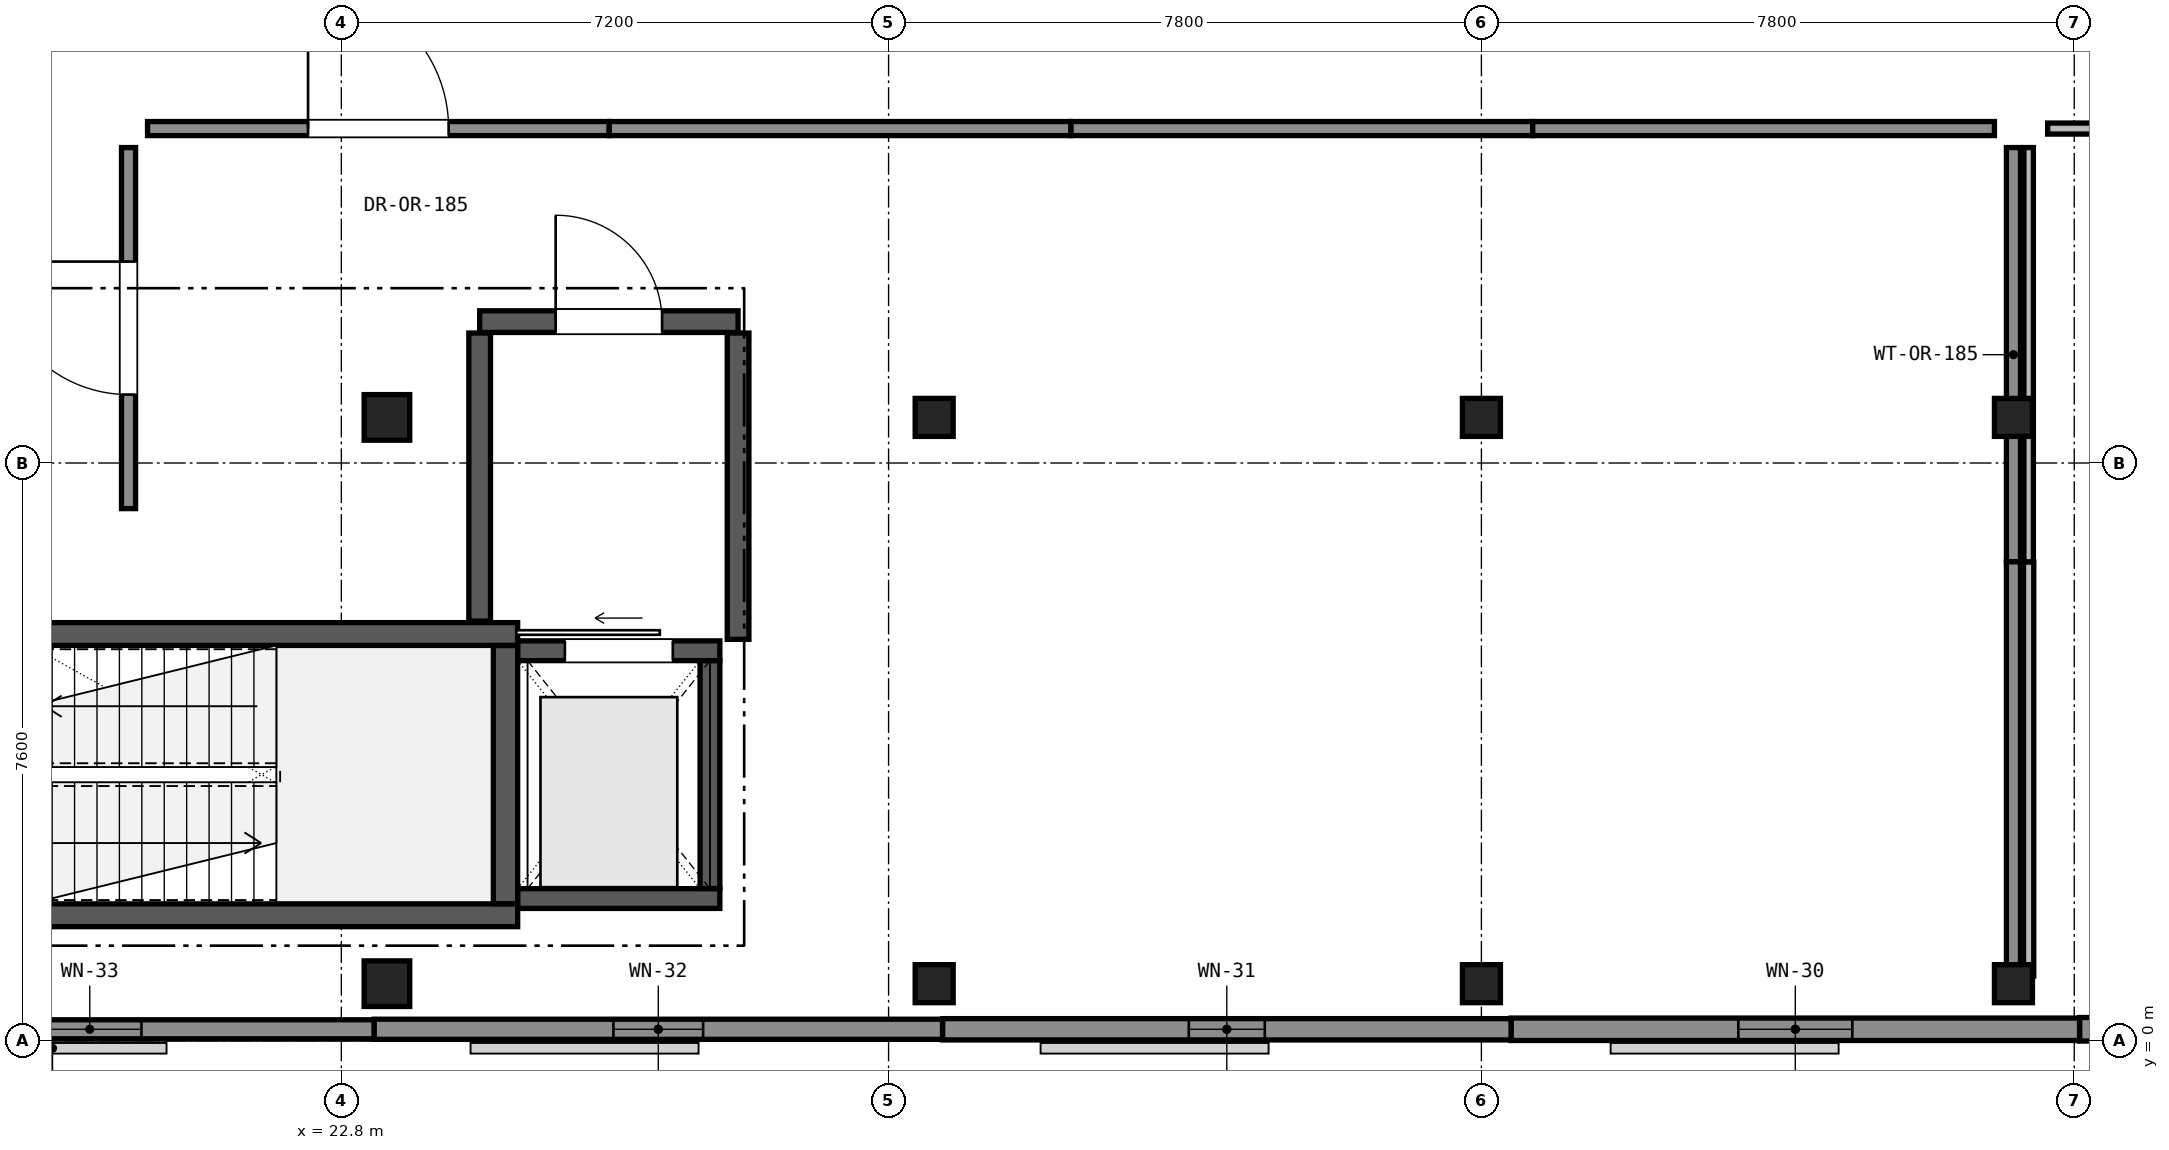
"""IFC4 building model, lengths in metres.
Left out: names, types, materials, properties, quantities, classifications, styles, units other than length and angle.
Written with IfcOpenShell. Run it as: python <this file> out.ifc"""

import sys

from ifc_helpers import new_model, si_unit, direction, frame, frame_2d, origin, origin_2d, place, context, subcontext, project, spatial, rectangle, extrude, element, fill, save


model = new_model("IFC4")
c1 = context("Model", 3, precision=1e-05, world=origin(), true_north=direction((0.0, 1.0)))
c2 = subcontext(c1, "Body", "Model", "MODEL_VIEW")
j1 = project(units=[si_unit("LENGTHUNIT", "METRE"), si_unit("PLANEANGLEUNIT", "RADIAN")], contexts=[c1])
p1 = place(None, origin())
s1 = spatial("IfcSite", under=j1, at=p1, CompositionType="ELEMENT")
p2 = place(p1, origin())
s2 = spatial("IfcBuilding", under=s1, at=p2, CompositionType="ELEMENT")
p3 = place(p2, frame((0.0, 0.0, 13.6)))
s3 = spatial("IfcBuildingStorey", under=s2, at=p3, CompositionType="ELEMENT", Elevation=13.6)
for number, where, z_axis, x_axis in (
    (1, (23.4, 0.75, 0.0), (0.0, 0.0, 1.0), (1.0, 0.0, 0.0)),
    (2, (23.4, 8.2, 0.0), (0.0, 0.0, 1.0), (1.0, 0.0, 0.0)),
):
    element("IfcColumn", number, at=place(p3, frame(where, z_axis=z_axis, x_axis=x_axis)), inside=s3, PredefinedType="COLUMN", context=c2, shape_type="SweptSolid", body=[
        extrude(rectangle(XDim=0.6, YDim=0.6, at=origin_2d()), origin(), (0.0, 0.0, 1.0), 4.08),
    ])
for number, where, z_axis, x_axis in (
    (3, (30.6, 0.75, 0.0), (0.0, 0.0, 1.0), (1.0, 0.0, 0.0)),
    (4, (30.6, 8.2, 0.0), (0.0, 0.0, 1.0), (1.0, 0.0, 0.0)),
    (5, (37.8, 0.75, 0.0), (0.0, 0.0, 1.0), (1.0, 0.0, 0.0)),
    (6, (37.8, 8.2, 0.0), (0.0, 0.0, 1.0), (1.0, 0.0, 0.0)),
    (7, (44.8, 0.75, 0.0), (0.0, 0.0, 1.0), (1.0, 0.0, 0.0)),
    (8, (44.8, 8.2, 0.0), (0.0, 0.0, 1.0), (1.0, 0.0, 0.0)),
):
    element("IfcColumn", number, at=place(p3, frame(where, z_axis=z_axis, x_axis=x_axis)), inside=s3, PredefinedType="COLUMN", context=c2, shape_type="SweptSolid", body=[
        extrude(rectangle(XDim=0.5, YDim=0.5, at=origin_2d()), origin(), (0.0, 0.0, 1.0), 4.08),
    ])
p4 = place(p3, frame((53.15, 0.15, 0.0), z_axis=(0.0, 0.0, 1.0), x_axis=(-1.0, 0.0, 0.0)))
e9 = element("IfcWall", 9, at=p4, inside=s3, PredefinedType="SOLIDWALL", context=c2, shape_type="SweptSolid", body=[
    extrude(rectangle(XDim=7.48, YDim=0.31, at=frame_2d((3.74, 0.0))), origin(), (0.0, 0.0, 1.0), 3.72),
])
p5 = place(p4, frame((2.49, 0.0, 0.9)))
e10 = element("IfcOpeningElement", 10, at=p5, cuts=e9, PredefinedType="OPENING", context=c2, shape_type="SweptSolid", body=[
    extrude(rectangle(XDim=2.5, YDim=2.0, at=frame_2d((1.25, 1.0))), frame((0.0, 0.165, 0.0), z_axis=(0.0, -1.0, 0.0), x_axis=(1.0, 0.0, 0.0)), (0.0, 0.0, 1.0), 0.33),
])
p6 = place(p3, frame((45.67, 0.15, 0.0), z_axis=(0.0, 0.0, 1.0), x_axis=(-1.0, 0.0, 0.0)))
e11 = element("IfcWall", 11, at=p6, inside=s3, PredefinedType="SOLIDWALL", context=c2, shape_type="SweptSolid", body=[
    extrude(rectangle(XDim=7.48, YDim=0.295, at=frame_2d((3.74, 0.0))), origin(), (0.0, 0.0, 1.0), 3.72),
])
p7 = place(p6, frame((2.99, 0.0, 0.9)))
e12 = element("IfcOpeningElement", 12, at=p7, cuts=e11, PredefinedType="OPENING", context=c2, shape_type="SweptSolid", body=[
    extrude(rectangle(XDim=1.5, YDim=2.2, at=frame_2d((0.75, 1.1))), frame((0.0, 0.157, 0.0), z_axis=(0.0, -1.0, 0.0), x_axis=(1.0, 0.0, 0.0)), (0.0, 0.0, 1.0), 0.315),
])
p8 = place(p3, frame((38.19, 0.15, 0.0), z_axis=(0.0, 0.0, 1.0), x_axis=(-1.0, 0.0, 0.0)))
e13 = element("IfcWall", 13, at=p8, inside=s3, PredefinedType="SOLIDWALL", context=c2, shape_type="SweptSolid", body=[
    extrude(rectangle(XDim=7.48, YDim=0.28, at=frame_2d((3.74, 0.0))), origin(), (0.0, 0.0, 1.0), 3.72),
])
p9 = place(p8, frame((3.24, 0.0, 0.9)))
e14 = element("IfcOpeningElement", 14, at=p9, cuts=e13, PredefinedType="OPENING", context=c2, shape_type="SweptSolid", body=[
    extrude(rectangle(XDim=1.0, YDim=1.62, at=frame_2d((0.5, 0.81))), frame((0.0, 0.15, 0.0), z_axis=(0.0, -1.0, 0.0), x_axis=(1.0, 0.0, 0.0)), (0.0, 0.0, 1.0), 0.3),
])
p10 = place(p3, frame((30.71, 0.15, 0.0), z_axis=(0.0, 0.0, 1.0), x_axis=(-1.0, 0.0, 0.0)))
e15 = element("IfcWall", 15, at=p10, inside=s3, PredefinedType="SOLIDWALL", context=c2, shape_type="SweptSolid", body=[
    extrude(rectangle(XDim=7.48, YDim=0.265, at=frame_2d((3.74, 0.0))), origin(), (0.0, 0.0, 1.0), 3.72),
])
p11 = place(p10, frame((3.15, 0.0, 0.9)))
e16 = element("IfcOpeningElement", 16, at=p11, cuts=e15, PredefinedType="OPENING", context=c2, shape_type="SweptSolid", body=[
    extrude(rectangle(XDim=1.18, YDim=1.62, at=frame_2d((0.59, 0.81))), frame((0.0, 0.142, 0.0), z_axis=(0.0, -1.0, 0.0), x_axis=(1.0, 0.0, 0.0)), (0.0, 0.0, 1.0), 0.285),
])
p12 = place(p3, frame((23.23, 0.15, 0.0), z_axis=(0.0, 0.0, 1.0), x_axis=(-1.0, 0.0, 0.0)))
e17 = element("IfcWall", 17, at=p12, inside=s3, PredefinedType="SOLIDWALL", context=c2, shape_type="SweptSolid", body=[
    extrude(rectangle(XDim=7.48, YDim=0.25, at=frame_2d((3.74, 0.0))), origin(), (0.0, 0.0, 1.0), 3.72),
])
p13 = place(p12, frame((3.06, 0.0, 0.9)))
e18 = element("IfcOpeningElement", 18, at=p13, cuts=e17, PredefinedType="OPENING", context=c2, shape_type="SweptSolid", body=[
    extrude(rectangle(XDim=1.36, YDim=1.62, at=frame_2d((0.68, 0.81))), frame((0.0, 0.135, 0.0), z_axis=(0.0, -1.0, 0.0), x_axis=(1.0, 0.0, 0.0)), (0.0, 0.0, 1.0), 0.27),
])
p14 = place(p3, frame((16.7, 1.65, 0.0), z_axis=(0.0, 0.0, 1.0), x_axis=(1.0, 0.0, 0.0)))
e19 = element("IfcWall", 19, at=p14, inside=s3, PredefinedType="SHEAR", context=c2, shape_type="SweptSolid", body=[
    extrude(rectangle(XDim=8.42, YDim=0.3, at=frame_2d((4.21, 0.0))), origin(), (0.0, 0.0, 1.0), 3.72),
])
p15 = place(p3, frame((16.7, 5.35, 0.0), z_axis=(0.0, 0.0, 1.0), x_axis=(1.0, 0.0, 0.0)))
e20 = element("IfcWall", 20, at=p15, inside=s3, PredefinedType="SHEAR", context=c2, shape_type="SweptSolid", body=[
    extrude(rectangle(XDim=8.42, YDim=0.3, at=frame_2d((4.21, 0.0))), origin(), (0.0, 0.0, 1.0), 3.72),
])
p16 = place(p15, frame((0.55, 0.0, 0.0)))
e21 = element("IfcOpeningElement", 21, at=p16, cuts=e20, PredefinedType="OPENING", context=c2, shape_type="SweptSolid", body=[
    extrude(rectangle(XDim=1.2, YDim=2.2, at=frame_2d((0.6, 1.1))), frame((0.0, 0.16, 0.0), z_axis=(0.0, -1.0, 0.0), x_axis=(1.0, 0.0, 0.0)), (0.0, 0.0, 1.0), 0.32),
])
p17 = place(p3, frame((24.96, 1.802, 0.0), z_axis=(0.0, 0.0, 1.0), x_axis=(0.0, 1.0, 0.0)))
e22 = element("IfcWall", 22, at=p17, inside=s3, PredefinedType="SHEAR", context=c2, shape_type="SweptSolid", body=[
    extrude(rectangle(XDim=3.396, YDim=0.32, at=frame_2d((1.698, 0.0))), origin(), (0.0, 0.0, 1.0), 3.72),
])
p18 = place(p3, frame((25.122, 1.87, 0.0), z_axis=(0.0, 0.0, 1.0), x_axis=(1.0, 0.0, 0.0)))
e23 = element("IfcWall", 23, at=p18, inside=s3, PredefinedType="SHEAR", context=c2, shape_type="SweptSolid", body=[
    extrude(rectangle(XDim=2.658, YDim=0.26, at=frame_2d((1.329, 0.0))), origin(), (0.0, 0.0, 1.0), 3.72),
])
p19 = place(p3, frame((25.122, 5.13, 0.0), z_axis=(0.0, 0.0, 1.0), x_axis=(1.0, 0.0, 0.0)))
e24 = element("IfcWall", 24, at=p19, inside=s3, PredefinedType="SHEAR", context=c2, shape_type="SweptSolid", body=[
    extrude(rectangle(XDim=2.658, YDim=0.26, at=frame_2d((1.329, 0.0))), origin(), (0.0, 0.0, 1.0), 3.72),
])
p20 = place(p19, frame((0.619, 0.0, 0.0)))
e25 = element("IfcOpeningElement", 25, at=p20, cuts=e24, PredefinedType="OPENING", context=c2, shape_type="SweptSolid", body=[
    extrude(rectangle(XDim=1.42, YDim=2.25, at=frame_2d((0.71, 1.125))), frame((0.0, 0.14, 0.0), z_axis=(0.0, -1.0, 0.0), x_axis=(1.0, 0.0, 0.0)), (0.0, 0.0, 1.0), 0.28),
])
p21 = place(p3, frame((27.65, 2.002, 0.0), z_axis=(0.0, 0.0, 1.0), x_axis=(0.0, 1.0, 0.0)))
e26 = element("IfcWall", 26, at=p21, inside=s3, PredefinedType="SHEAR", context=c2, shape_type="SweptSolid", body=[
    extrude(rectangle(XDim=2.996, YDim=0.26, at=frame_2d((1.498, 0.0))), origin(), (0.0, 0.0, 1.0), 3.72),
])
p22 = place(p3, frame((24.62, 9.46, 0.0), z_axis=(0.0, 0.0, 1.0), x_axis=(1.0, 0.0, 0.0)))
e27 = element("IfcWall", 27, at=p22, inside=s3, PredefinedType="SHEAR", context=c2, shape_type="SweptSolid", body=[
    extrude(rectangle(XDim=3.4, YDim=0.285, at=frame_2d((1.7, 0.0))), origin(), (0.0, 0.0, 1.0), 3.72),
])
p23 = place(p22, frame((1.0, 0.0, 0.0)))
e28 = element("IfcOpeningElement", 28, at=p23, cuts=e27, PredefinedType="OPENING", context=c2, shape_type="SweptSolid", body=[
    extrude(rectangle(XDim=1.4, YDim=2.25, at=frame_2d((0.7, 1.125))), frame((0.0, 0.152, 0.0), z_axis=(0.0, -1.0, 0.0), x_axis=(1.0, 0.0, 0.0)), (0.0, 0.0, 1.0), 0.305),
])
p24 = place(p3, frame((24.62, 5.52, 0.0), z_axis=(0.0, 0.0, 1.0), x_axis=(0.0, 1.0, 0.0)))
e29 = element("IfcWall", 29, at=p24, inside=s3, PredefinedType="SHEAR", context=c2, shape_type="SweptSolid", body=[
    extrude(rectangle(XDim=3.79, YDim=0.285, at=frame_2d((1.895, 0.0))), origin(), (0.0, 0.0, 1.0), 2.77),
])
p25 = place(p3, frame((28.02, 5.28, 0.0), z_axis=(0.0, 0.0, 1.0), x_axis=(0.0, 1.0, 0.0)))
e30 = element("IfcWall", 30, at=p25, inside=s3, PredefinedType="SHEAR", context=c2, shape_type="SweptSolid", body=[
    extrude(rectangle(XDim=4.03, YDim=0.285, at=frame_2d((2.015, 0.0))), origin(), (0.0, 0.0, 1.0), 2.77),
])
p26 = place(p3, frame((44.8, 11.75, 0.0), z_axis=(0.0, 0.0, 1.0), x_axis=(0.0, -1.0, 0.0)))
e31 = element("IfcWall", 31, at=p26, inside=s3, PredefinedType="PARTITIONING", context=c2, shape_type="SweptSolid", body=[
    extrude(rectangle(XDim=5.45, YDim=0.185, at=frame_2d((2.725, 0.0))), origin(), (0.0, 0.0, 1.0), 2.92),
])
p27 = place(p3, frame((44.8, 6.3, 0.0), z_axis=(0.0, 0.0, 1.0), x_axis=(0.0, -1.0, 0.0)))
e32 = element("IfcWall", 32, at=p27, inside=s3, PredefinedType="PARTITIONING", context=c2, shape_type="SweptSolid", body=[
    extrude(rectangle(XDim=5.45, YDim=0.185, at=frame_2d((2.725, 0.0))), origin(), (0.0, 0.0, 1.0), 2.97),
])
p28 = place(p3, frame((20.0, 7.0, 0.0), z_axis=(0.0, 0.0, 1.0), x_axis=(0.0, 1.0, 0.0)))
e33 = element("IfcWall", 33, at=p28, inside=s3, PredefinedType="PARTITIONING", context=c2, shape_type="SweptSolid", body=[
    extrude(rectangle(XDim=4.75, YDim=0.185, at=frame_2d((2.375, 0.0))), origin(), (0.0, 0.0, 1.0), 2.77),
])
p29 = place(p28, frame((1.5, 0.0, 0.0)))
e34 = element("IfcOpeningElement", 34, at=p29, cuts=e33, PredefinedType="OPENING", context=c2, shape_type="SweptSolid", body=[
    extrude(rectangle(XDim=1.75, YDim=2.4, at=frame_2d((0.875, 1.2))), frame((0.0, 0.103, 0.0), z_axis=(0.0, -1.0, 0.0), x_axis=(1.0, 0.0, 0.0)), (0.0, 0.0, 1.0), 0.205),
])
p30 = place(p3, frame((20.25, 12.0, 0.0), z_axis=(0.0, 0.0, 1.0), x_axis=(1.0, 0.0, 0.0)))
e35 = element("IfcWall", 35, at=p30, inside=s3, PredefinedType="PARTITIONING", context=c2, shape_type="SweptSolid", body=[
    extrude(rectangle(XDim=6.075, YDim=0.185, at=frame_2d((3.038, 0.0))), origin(), (0.0, 0.0, 1.0), 3.17),
])
p31 = place(p30, frame((2.112, 0.0, 0.0)))
e36 = element("IfcOpeningElement", 36, at=p31, cuts=e35, PredefinedType="OPENING", context=c2, shape_type="SweptSolid", body=[
    extrude(rectangle(XDim=1.85, YDim=2.4, at=frame_2d((0.925, 1.2))), frame((0.0, 0.103, 0.0), z_axis=(0.0, -1.0, 0.0), x_axis=(1.0, 0.0, 0.0)), (0.0, 0.0, 1.0), 0.205),
])
p32 = place(p3, frame((26.325, 12.0, 0.0), z_axis=(0.0, 0.0, 1.0), x_axis=(1.0, 0.0, 0.0)))
e37 = element("IfcWall", 37, at=p32, inside=s3, PredefinedType="PARTITIONING", context=c2, shape_type="SweptSolid", body=[
    extrude(rectangle(XDim=6.075, YDim=0.185, at=frame_2d((3.038, 0.0))), origin(), (0.0, 0.0, 1.0), 3.02),
])
p33 = place(p3, frame((32.4, 12.0, 0.0), z_axis=(0.0, 0.0, 1.0), x_axis=(1.0, 0.0, 0.0)))
e38 = element("IfcWall", 38, at=p33, inside=s3, PredefinedType="PARTITIONING", context=c2, shape_type="SweptSolid", body=[
    extrude(rectangle(XDim=6.075, YDim=0.185, at=frame_2d((3.038, 0.0))), origin(), (0.0, 0.0, 1.0), 2.92),
])
p34 = place(p3, frame((38.475, 12.0, 0.0), z_axis=(0.0, 0.0, 1.0), x_axis=(1.0, 0.0, 0.0)))
e39 = element("IfcWall", 39, at=p34, inside=s3, PredefinedType="PARTITIONING", context=c2, shape_type="SweptSolid", body=[
    extrude(rectangle(XDim=6.075, YDim=0.185, at=frame_2d((3.038, 0.0))), origin(), (0.0, 0.0, 1.0), 3.12),
])
p35 = place(p3, frame((45.25, 12.0, 0.0), z_axis=(0.0, 0.0, 1.0), x_axis=(1.0, 0.0, 0.0)))
e40 = element("IfcWall", 40, at=p35, inside=s3, PredefinedType="PARTITIONING", context=c2, shape_type="SweptSolid", body=[
    extrude(rectangle(XDim=7.3, YDim=0.145, at=frame_2d((3.65, 0.0))), origin(), (0.0, 0.0, 1.0), 3.045),
])
p36 = place(p35, frame((3.21, 0.0, 0.0)))
e41 = element("IfcOpeningElement", 41, at=p36, cuts=e40, PredefinedType="OPENING", context=c2, shape_type="SweptSolid", body=[
    extrude(rectangle(XDim=0.88, YDim=2.1, at=frame_2d((0.44, 1.05))), frame((0.0, 0.083, 0.0), z_axis=(0.0, -1.0, 0.0), x_axis=(1.0, 0.0, 0.0)), (0.0, 0.0, 1.0), 0.165),
])
p37 = place(p3, frame((45.0, 0.85, 0.0), z_axis=(0.0, 0.0, 1.0), x_axis=(0.0, 1.0, 0.0)))
e42 = element("IfcWall", 42, at=p37, inside=s3, PredefinedType="PARTITIONING", context=c2, shape_type="SweptSolid", body=[
    extrude(rectangle(XDim=5.45, YDim=0.135, at=frame_2d((2.725, 0.0))), origin(), (0.0, 0.0, 1.0), 2.995),
])
p38 = place(p3, frame((45.0, 6.3, 0.0), z_axis=(0.0, 0.0, 1.0), x_axis=(0.0, 1.0, 0.0)))
e43 = element("IfcWall", 43, at=p38, inside=s3, PredefinedType="PARTITIONING", context=c2, shape_type="SweptSolid", body=[
    extrude(rectangle(XDim=5.45, YDim=0.125, at=frame_2d((2.725, 0.0))), origin(), (0.0, 0.0, 1.0), 3.12),
])
p39 = place(p7, origin())
e44 = element("IfcWindow", 44, at=p39, inside=s3, PartitioningType="SINGLE_PANEL", PredefinedType="WINDOW", context=c2, shape_type="SweptSolid", body=[
    extrude(rectangle(XDim=1.5, YDim=2.2, at=frame_2d((0.75, 1.1))), frame((0.0, 0.03, 0.0), z_axis=(0.0, -1.0, 0.0), x_axis=(1.0, 0.0, 0.0)), (0.0, 0.0, 1.0), 0.06),
])
fill(e12, e44)
p40 = place(p9, origin())
e45 = element("IfcWindow", 45, at=p40, inside=s3, PartitioningType="SINGLE_PANEL", PredefinedType="WINDOW", context=c2, shape_type="SweptSolid", body=[
    extrude(rectangle(XDim=1.0, YDim=1.62, at=frame_2d((0.5, 0.81))), frame((0.0, 0.03, 0.0), z_axis=(0.0, -1.0, 0.0), x_axis=(1.0, 0.0, 0.0)), (0.0, 0.0, 1.0), 0.06),
])
fill(e14, e45)
p41 = place(p11, origin())
e46 = element("IfcWindow", 46, at=p41, inside=s3, PartitioningType="SINGLE_PANEL", PredefinedType="WINDOW", context=c2, shape_type="SweptSolid", body=[
    extrude(rectangle(XDim=1.18, YDim=1.62, at=frame_2d((0.59, 0.81))), frame((0.0, 0.03, 0.0), z_axis=(0.0, -1.0, 0.0), x_axis=(1.0, 0.0, 0.0)), (0.0, 0.0, 1.0), 0.06),
])
fill(e16, e46)
p42 = place(p13, origin())
e47 = element("IfcWindow", 47, at=p42, inside=s3, PartitioningType="SINGLE_PANEL", PredefinedType="WINDOW", context=c2, shape_type="SweptSolid", body=[
    extrude(rectangle(XDim=1.36, YDim=1.62, at=frame_2d((0.68, 0.81))), frame((0.0, 0.03, 0.0), z_axis=(0.0, -1.0, 0.0), x_axis=(1.0, 0.0, 0.0)), (0.0, 0.0, 1.0), 0.06),
])
fill(e18, e47)
p43 = place(p20, origin())
e48 = element("IfcDoor", 48, at=p43, inside=s3, OperationType="SLIDING_TO_LEFT", PredefinedType="DOOR", context=c2, shape_type="SweptSolid", body=[
    extrude(rectangle(XDim=1.42, YDim=2.25, at=frame_2d((0.71, 1.125))), frame((0.0, 0.025, 0.0), z_axis=(0.0, -1.0, 0.0), x_axis=(1.0, 0.0, 0.0)), (0.0, 0.0, 1.0), 0.05),
])
fill(e25, e48)
p44 = place(p23, origin())
e49 = element("IfcDoor", 49, at=p44, inside=s3, OperationType="SINGLE_SWING_LEFT", PredefinedType="DOOR", context=c2, shape_type="SweptSolid", body=[
    extrude(rectangle(XDim=1.4, YDim=2.25, at=frame_2d((0.7, 1.125))), frame((0.0, 0.025, 0.0), z_axis=(0.0, -1.0, 0.0), x_axis=(1.0, 0.0, 0.0)), (0.0, 0.0, 1.0), 0.05),
])
fill(e28, e49)
p45 = place(p29, origin())
e50 = element("IfcDoor", 50, at=p45, inside=s3, OperationType="SINGLE_SWING_RIGHT", PredefinedType="DOOR", context=c2, shape_type="SweptSolid", body=[
    extrude(rectangle(XDim=1.75, YDim=2.4, at=frame_2d((0.875, 1.2))), frame((0.0, 0.025, 0.0), z_axis=(0.0, -1.0, 0.0), x_axis=(1.0, 0.0, 0.0)), (0.0, 0.0, 1.0), 0.05),
])
fill(e34, e50)
p46 = place(p31, origin())
e51 = element("IfcDoor", 51, at=p46, inside=s3, OperationType="SINGLE_SWING_LEFT", PredefinedType="DOOR", context=c2, shape_type="SweptSolid", body=[
    extrude(rectangle(XDim=1.85, YDim=2.4, at=frame_2d((0.925, 1.2))), frame((0.0, 0.025, 0.0), z_axis=(0.0, -1.0, 0.0), x_axis=(1.0, 0.0, 0.0)), (0.0, 0.0, 1.0), 0.05),
])
fill(e36, e51)
save(model, sys.argv[1])
